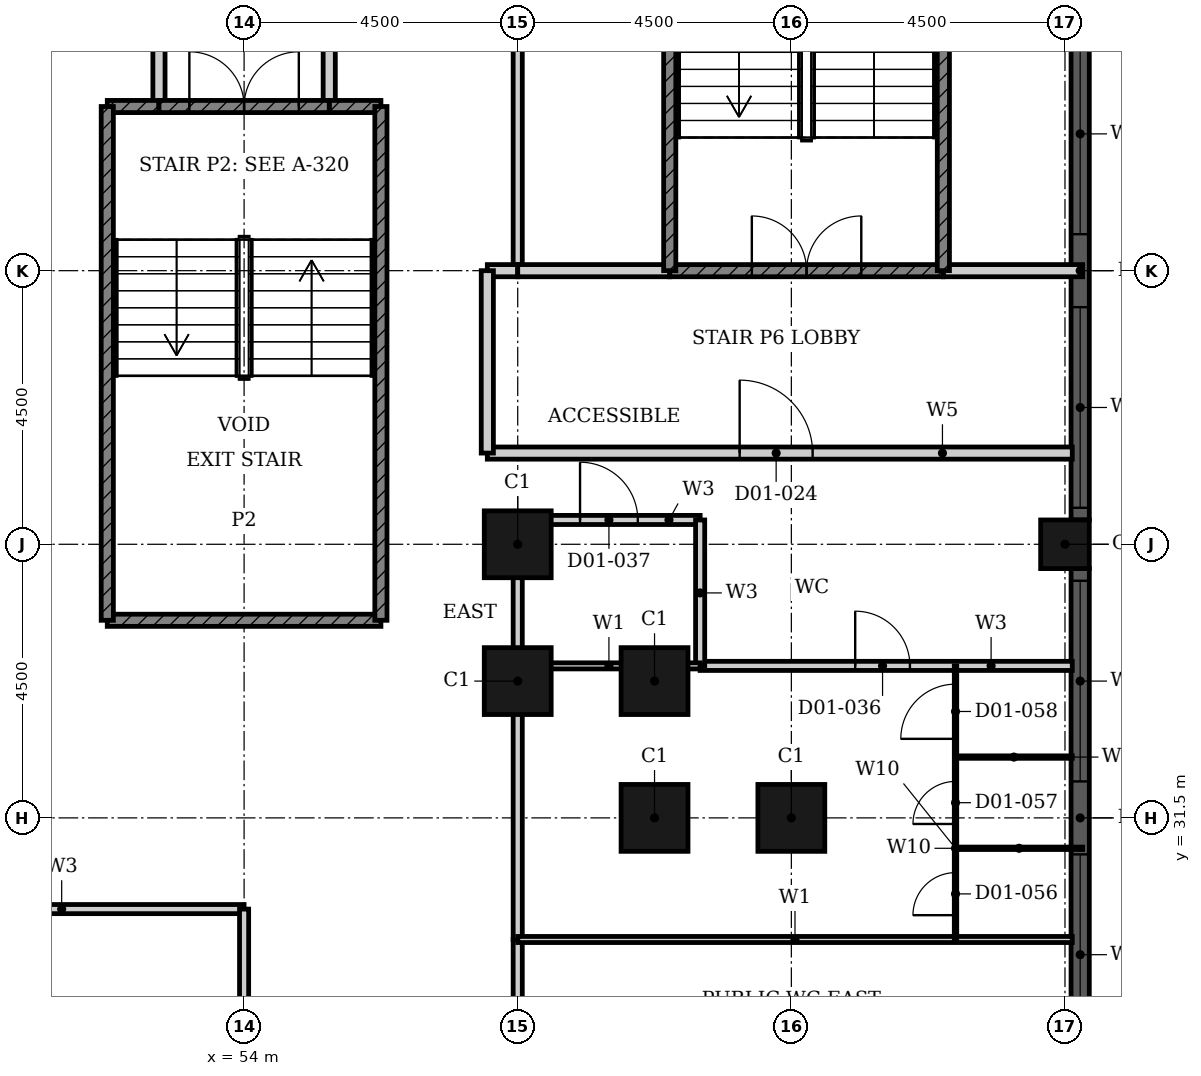
"""IFC4 building model, lengths in metres.
Left out: names, types, materials, properties, quantities, classifications, styles, units other than length and angle.
Written with IfcOpenShell. Run it as: python <this file> out.ifc"""

import sys

from ifc_helpers import new_model, si_unit, direction, frame, frame_2d, origin, origin_2d, place, context, subcontext, project, spatial, rectangle, hollow_rectangle, extrude, element, fill, save


model = new_model("IFC4")
c1 = context("Model", 3, precision=1e-05, world=origin(), true_north=direction((0.0, 1.0)))
c2 = subcontext(c1, "Body", "Model", "MODEL_VIEW")
j1 = project(units=[si_unit("LENGTHUNIT", "METRE"), si_unit("PLANEANGLEUNIT", "RADIAN")], contexts=[c1])
p1 = place(None, origin())
s1 = spatial("IfcSite", under=j1, at=p1, CompositionType="ELEMENT")
p2 = place(p1, origin())
s2 = spatial("IfcBuilding", under=s1, at=p2, CompositionType="ELEMENT")
p3 = place(p2, frame((0.0, 0.0, 6.6)))
s3 = spatial("IfcBuildingStorey", under=s2, at=p3, CompositionType="ELEMENT", Elevation=6.6)
for number, where, z_axis, x_axis in (
    (1, (63.0, 31.5, 0.0), (0.0, 0.0, 1.0), (1.0, 0.0, 0.0)),
    (2, (60.75, 31.5, 0.0), (0.0, 0.0, 1.0), (1.0, 0.0, 0.0)),
    (3, (60.75, 33.75, 0.0), (0.0, 0.0, 1.0), (1.0, 0.0, 0.0)),
    (4, (58.5, 33.75, 0.0), (0.0, 0.0, 1.0), (1.0, 0.0, 0.0)),
    (5, (58.5, 36.0, 0.0), (0.0, 0.0, 1.0), (1.0, 0.0, 0.0)),
):
    element("IfcColumn", number, at=place(p3, frame(where, z_axis=z_axis, x_axis=x_axis)), inside=s3, PredefinedType="COLUMN", context=c2, shape_type="SweptSolid", body=[
        extrude(hollow_rectangle(XDim=1.1, YDim=1.1, WallThickness=0.036, at=origin_2d()), origin(), (0.0, 0.0, 1.0), 5.4),
    ])
p4 = place(p3, frame((67.5, 36.0, 0.0), z_axis=(0.0, 0.0, 1.0), x_axis=(1.0, 0.0, 0.0)))
e6 = element("IfcColumn", 6, at=p4, inside=s3, PredefinedType="COLUMN", context=c2, shape_type="SweptSolid", body=[
    extrude(hollow_rectangle(XDim=0.8, YDim=0.8, WallThickness=0.025, at=origin_2d()), origin(), (0.0, 0.0, 1.0), 5.4),
])
p5 = place(p3, frame((67.75, 27.4, 0.0), z_axis=(0.0, 0.0, 1.0), x_axis=(0.0, 1.0, 0.0)))
e7 = element("IfcWall", 7, at=p5, inside=s3, PredefinedType="SOLIDWALL", context=c2, shape_type="SweptSolid", body=[
    extrude(rectangle(XDim=8.2, YDim=0.3, at=frame_2d((4.1, 0.0))), origin(), (0.0, 0.0, 1.0), 5.4),
])
p6 = place(p5, frame((0.2, 0.0, 0.9)))
e8 = element("IfcOpeningElement", 8, at=p6, cuts=e7, PredefinedType="OPENING", context=c2, shape_type="SweptSolid", body=[
    extrude(rectangle(XDim=3.3, YDim=3.5, at=frame_2d((1.65, 1.75))), frame((0.0, 0.16, 0.0), z_axis=(0.0, -1.0, 0.0), x_axis=(1.0, 0.0, 0.0)), (0.0, 0.0, 1.0), 0.32),
])
p7 = place(p5, frame((4.7, 0.0, 0.9)))
e9 = element("IfcOpeningElement", 9, at=p7, cuts=e7, PredefinedType="OPENING", context=c2, shape_type="SweptSolid", body=[
    extrude(rectangle(XDim=3.3, YDim=3.5, at=frame_2d((1.65, 1.75))), frame((0.0, 0.16, 0.0), z_axis=(0.0, -1.0, 0.0), x_axis=(1.0, 0.0, 0.0)), (0.0, 0.0, 1.0), 0.32),
])
p8 = place(p3, frame((67.75, 36.4, 0.0), z_axis=(0.0, 0.0, 1.0), x_axis=(0.0, 1.0, 0.0)))
e10 = element("IfcWall", 10, at=p8, inside=s3, PredefinedType="SOLIDWALL", context=c2, shape_type="SweptSolid", body=[
    extrude(rectangle(XDim=8.2, YDim=0.3, at=frame_2d((4.1, 0.0))), origin(), (0.0, 0.0, 1.0), 5.4),
])
p9 = place(p8, frame((0.2, 0.0, 0.9)))
e11 = element("IfcOpeningElement", 11, at=p9, cuts=e10, PredefinedType="OPENING", context=c2, shape_type="SweptSolid", body=[
    extrude(rectangle(XDim=3.3, YDim=3.5, at=frame_2d((1.65, 1.75))), frame((0.0, 0.16, 0.0), z_axis=(0.0, -1.0, 0.0), x_axis=(1.0, 0.0, 0.0)), (0.0, 0.0, 1.0), 0.32),
])
p10 = place(p8, frame((4.7, 0.0, 0.9)))
e12 = element("IfcOpeningElement", 12, at=p10, cuts=e10, PredefinedType="OPENING", context=c2, shape_type="SweptSolid", body=[
    extrude(rectangle(XDim=3.3, YDim=3.5, at=frame_2d((1.65, 1.75))), frame((0.0, 0.16, 0.0), z_axis=(0.0, -1.0, 0.0), x_axis=(1.0, 0.0, 0.0)), (0.0, 0.0, 1.0), 0.32),
])
p11 = place(p3, frame((48.0, 30.0, 0.0), z_axis=(0.0, 0.0, 1.0), x_axis=(1.0, 0.0, 0.0)))
e13 = element("IfcWall", 13, at=p11, inside=s3, PredefinedType="PARTITIONING", context=c2, shape_type="SweptSolid", body=[
    extrude(rectangle(XDim=6.0, YDim=0.15, at=frame_2d((3.0, 0.0))), origin(), (0.0, 0.0, 1.0), 5.05),
])
p12 = place(p3, frame((61.5, 34.0, 0.0), z_axis=(0.0, 0.0, 1.0), x_axis=(1.0, 0.0, 0.0)))
e14 = element("IfcWall", 14, at=p12, inside=s3, PredefinedType="PARTITIONING", context=c2, shape_type="SweptSolid", body=[
    extrude(rectangle(XDim=6.12, YDim=0.15, at=frame_2d((3.06, 0.0))), origin(), (0.0, 0.0, 1.0), 5.05),
])
p13 = place(p12, frame((2.55, 0.0, 0.0)))
e15 = element("IfcOpeningElement", 15, at=p13, cuts=e14, PredefinedType="OPENING", context=c2, shape_type="SweptSolid", body=[
    extrude(rectangle(XDim=0.9, YDim=2.1, at=frame_2d((0.45, 1.05))), frame((0.0, 0.085, 0.0), z_axis=(0.0, -1.0, 0.0), x_axis=(1.0, 0.0, 0.0)), (0.0, 0.0, 1.0), 0.17),
])
p14 = place(p3, frame((58.5, 36.4, 0.0), z_axis=(0.0, 0.0, 1.0), x_axis=(1.0, 0.0, 0.0)))
e16 = element("IfcWall", 16, at=p14, inside=s3, PredefinedType="PARTITIONING", context=c2, shape_type="SweptSolid", body=[
    extrude(rectangle(XDim=3.0, YDim=0.15, at=frame_2d((1.5, 0.0))), origin(), (0.0, 0.0, 1.0), 5.05),
])
p15 = place(p14, frame((1.025, 0.0, 0.0)))
e17 = element("IfcOpeningElement", 17, at=p15, cuts=e16, PredefinedType="OPENING", context=c2, shape_type="SweptSolid", body=[
    extrude(rectangle(XDim=0.95, YDim=2.1, at=frame_2d((0.475, 1.05))), frame((0.0, 0.085, 0.0), z_axis=(0.0, -1.0, 0.0), x_axis=(1.0, 0.0, 0.0)), (0.0, 0.0, 1.0), 0.17),
])
p16 = place(p3, frame((54.0, 24.0, 0.0), z_axis=(0.0, 0.0, 1.0), x_axis=(0.0, 1.0, 0.0)))
e18 = element("IfcWall", 18, at=p16, inside=s3, PredefinedType="PARTITIONING", context=c2, shape_type="SweptSolid", body=[
    extrude(rectangle(XDim=6.0, YDim=0.15, at=frame_2d((3.0, 0.0))), origin(), (0.0, 0.0, 1.0), 5.05),
])
p17 = place(p3, frame((58.5, 23.0, 0.0), z_axis=(0.0, 0.0, 1.0), x_axis=(0.0, 1.0, 0.0)))
e19 = element("IfcWall", 19, at=p17, inside=s3, PredefinedType="PARTITIONING", context=c2, shape_type="SweptSolid", body=[
    extrude(rectangle(XDim=6.5, YDim=0.15, at=frame_2d((3.25, 0.0))), origin(), (0.0, 0.0, 1.0), 5.05),
])
p18 = place(p17, frame((1.6, 0.0, 0.0)))
e20 = element("IfcOpeningElement", 20, at=p18, cuts=e19, PredefinedType="OPENING", context=c2, shape_type="SweptSolid", body=[
    extrude(rectangle(XDim=1.5, YDim=2.4, at=frame_2d((0.75, 1.2))), frame((0.0, 0.085, 0.0), z_axis=(0.0, -1.0, 0.0), x_axis=(1.0, 0.0, 0.0)), (0.0, 0.0, 1.0), 0.17),
])
p19 = place(p3, frame((58.5, 29.5, 0.0), z_axis=(0.0, 0.0, 1.0), x_axis=(0.0, 1.0, 0.0)))
e21 = element("IfcWall", 21, at=p19, inside=s3, PredefinedType="PARTITIONING", context=c2, shape_type="SweptSolid", body=[
    extrude(rectangle(XDim=4.5, YDim=0.15, at=frame_2d((2.25, 0.0))), origin(), (0.0, 0.0, 1.0), 5.05),
])
p20 = place(p3, frame((58.5, 34.0, 0.0), z_axis=(0.0, 0.0, 1.0), x_axis=(0.0, 1.0, 0.0)))
e22 = element("IfcWall", 22, at=p20, inside=s3, PredefinedType="PARTITIONING", context=c2, shape_type="SweptSolid", body=[
    extrude(rectangle(XDim=2.4, YDim=0.15, at=frame_2d((1.2, 0.0))), origin(), (0.0, 0.0, 1.0), 5.05),
])
p21 = place(p3, frame((58.5, 40.5, 0.0), z_axis=(0.0, 0.0, 1.0), x_axis=(0.0, 1.0, 0.0)))
e23 = element("IfcWall", 23, at=p21, inside=s3, PredefinedType="PARTITIONING", context=c2, shape_type="SweptSolid", body=[
    extrude(rectangle(XDim=13.69, YDim=0.15, at=frame_2d((6.845, 0.0))), origin(), (0.0, 0.0, 1.0), 5.05),
])
p22 = place(p21, frame((6.0, 0.0, 0.0)))
e24 = element("IfcOpeningElement", 24, at=p22, cuts=e23, PredefinedType="OPENING", context=c2, shape_type="SweptSolid", body=[
    extrude(rectangle(XDim=1.5, YDim=2.4, at=frame_2d((0.75, 1.2))), frame((0.0, 0.085, 0.0), z_axis=(0.0, -1.0, 0.0), x_axis=(1.0, 0.0, 0.0)), (0.0, 0.0, 1.0), 0.17),
])
p23 = place(p3, frame((61.5, 34.0, 0.0), z_axis=(0.0, 0.0, 1.0), x_axis=(0.0, 1.0, 0.0)))
e25 = element("IfcWall", 25, at=p23, inside=s3, PredefinedType="PARTITIONING", context=c2, shape_type="SweptSolid", body=[
    extrude(rectangle(XDim=2.4, YDim=0.15, at=frame_2d((1.2, 0.0))), origin(), (0.0, 0.0, 1.0), 5.05),
])
p24 = place(p3, frame((58.5, 29.5, 0.0), z_axis=(0.0, 0.0, 1.0), x_axis=(1.0, 0.0, 0.0)))
e26 = element("IfcWall", 26, at=p24, inside=s3, PredefinedType="PARTITIONING", context=c2, shape_type="SweptSolid", body=[
    extrude(rectangle(XDim=9.12, YDim=0.1, at=frame_2d((4.56, 0.0))), origin(), (0.0, 0.0, 1.0), 5.05),
])
p25 = place(p3, frame((58.5, 34.0, 0.0), z_axis=(0.0, 0.0, 1.0), x_axis=(1.0, 0.0, 0.0)))
e27 = element("IfcWall", 27, at=p25, inside=s3, PredefinedType="PARTITIONING", context=c2, shape_type="SweptSolid", body=[
    extrude(rectangle(XDim=3.0, YDim=0.1, at=frame_2d((1.5, 0.0))), origin(), (0.0, 0.0, 1.0), 5.05),
])
p26 = place(p3, frame((58.0, 37.5, 0.0), z_axis=(0.0, 0.0, 1.0), x_axis=(1.0, 0.0, 0.0)))
e28 = element("IfcWall", 28, at=p26, inside=s3, PredefinedType="PARTITIONING", context=c2, shape_type="SweptSolid", body=[
    extrude(rectangle(XDim=9.62, YDim=0.2, at=frame_2d((4.81, 0.0))), origin(), (0.0, 0.0, 1.0), 5.05),
])
p27 = place(p26, frame((4.15, 0.0, 0.0)))
e29 = element("IfcOpeningElement", 29, at=p27, cuts=e28, PredefinedType="OPENING", context=c2, shape_type="SweptSolid", body=[
    extrude(rectangle(XDim=1.2, YDim=2.1, at=frame_2d((0.6, 1.05))), frame((0.0, 0.11, 0.0), z_axis=(0.0, -1.0, 0.0), x_axis=(1.0, 0.0, 0.0)), (0.0, 0.0, 1.0), 0.22),
])
p28 = place(p3, frame((58.0, 40.5, 0.0), z_axis=(0.0, 0.0, 1.0), x_axis=(1.0, 0.0, 0.0)))
e30 = element("IfcWall", 30, at=p28, inside=s3, PredefinedType="PARTITIONING", context=c2, shape_type="SweptSolid", body=[
    extrude(rectangle(XDim=0.5, YDim=0.2, at=frame_2d((0.25, 0.0))), origin(), (0.0, 0.0, 1.0), 5.05),
])
p29 = place(p3, frame((58.5, 40.5, 0.0), z_axis=(0.0, 0.0, 1.0), x_axis=(1.0, 0.0, 0.0)))
e31 = element("IfcWall", 31, at=p29, inside=s3, PredefinedType="PARTITIONING", context=c2, shape_type="SweptSolid", body=[
    extrude(rectangle(XDim=2.5, YDim=0.2, at=frame_2d((1.25, 0.0))), origin(), (0.0, 0.0, 1.0), 5.05),
])
p30 = place(p3, frame((65.5, 40.5, 0.0), z_axis=(0.0, 0.0, 1.0), x_axis=(1.0, 0.0, 0.0)))
e32 = element("IfcWall", 32, at=p30, inside=s3, PredefinedType="PARTITIONING", context=c2, shape_type="SweptSolid", body=[
    extrude(rectangle(XDim=2.29, YDim=0.2, at=frame_2d((1.145, 0.0))), origin(), (0.0, 0.0, 1.0), 5.05),
])
p31 = place(p3, frame((52.6, 43.2, 0.0), z_axis=(0.0, 0.0, 1.0), x_axis=(0.0, 1.0, 0.0)))
e33 = element("IfcWall", 33, at=p31, inside=s3, PredefinedType="PARTITIONING", context=c2, shape_type="SweptSolid", body=[
    extrude(rectangle(XDim=1.8, YDim=0.2, at=frame_2d((0.9, 0.0))), origin(), (0.0, 0.0, 1.0), 5.05),
])
p32 = place(p3, frame((55.4, 43.2, 0.0), z_axis=(0.0, 0.0, 1.0), x_axis=(0.0, 1.0, 0.0)))
e34 = element("IfcWall", 34, at=p32, inside=s3, PredefinedType="PARTITIONING", context=c2, shape_type="SweptSolid", body=[
    extrude(rectangle(XDim=10.92, YDim=0.2, at=frame_2d((5.46, 0.0))), origin(), (0.0, 0.0, 1.0), 5.05),
])
p33 = place(p32, frame((4.8, 0.0, 0.0)))
e35 = element("IfcOpeningElement", 35, at=p33, cuts=e34, PredefinedType="OPENING", context=c2, shape_type="SweptSolid", body=[
    extrude(rectangle(XDim=1.2, YDim=2.1, at=frame_2d((0.6, 1.05))), frame((0.0, 0.11, 0.0), z_axis=(0.0, -1.0, 0.0), x_axis=(1.0, 0.0, 0.0)), (0.0, 0.0, 1.0), 0.22),
])
p34 = place(p3, frame((58.0, 37.5, 0.0), z_axis=(0.0, 0.0, 1.0), x_axis=(0.0, 1.0, 0.0)))
e36 = element("IfcWall", 36, at=p34, inside=s3, PredefinedType="PARTITIONING", context=c2, shape_type="SweptSolid", body=[
    extrude(rectangle(XDim=3.0, YDim=0.2, at=frame_2d((1.5, 0.0))), origin(), (0.0, 0.0, 1.0), 5.05),
])
p35 = place(p3, frame((51.75, 34.75, 0.0), z_axis=(0.0, 0.0, 1.0), x_axis=(1.0, 0.0, 0.0)))
e37 = element("IfcWall", 37, at=p35, inside=s3, PredefinedType="SHEAR", context=c2, shape_type="SweptSolid", body=[
    extrude(rectangle(XDim=4.5, YDim=0.2, at=frame_2d((2.25, 0.0))), origin(), (0.0, 0.0, 1.0), 5.05),
])
p36 = place(p3, frame((61.0, 40.5, 0.0), z_axis=(0.0, 0.0, 1.0), x_axis=(1.0, 0.0, 0.0)))
e38 = element("IfcWall", 38, at=p36, inside=s3, PredefinedType="SHEAR", context=c2, shape_type="SweptSolid", body=[
    extrude(rectangle(XDim=4.5, YDim=0.2, at=frame_2d((2.25, 0.0))), origin(), (0.0, 0.0, 1.0), 5.05),
])
p37 = place(p36, frame((1.35, 0.0, 0.0)))
e39 = element("IfcOpeningElement", 39, at=p37, cuts=e38, PredefinedType="OPENING", context=c2, shape_type="SweptSolid", body=[
    extrude(rectangle(XDim=1.8, YDim=2.1, at=frame_2d((0.9, 1.05))), frame((0.0, 0.11, 0.0), z_axis=(0.0, -1.0, 0.0), x_axis=(1.0, 0.0, 0.0)), (0.0, 0.0, 1.0), 0.22),
])
for number, where, z_axis, x_axis in (
    (40, (51.75, 43.2, 0.0), (0.0, 0.0, 1.0), (1.0, 0.0, 0.0)),
    (41, (55.4, 43.2, 0.0), (0.0, 0.0, 1.0), (1.0, 0.0, 0.0)),
):
    element("IfcWall", number, at=place(p3, frame(where, z_axis=z_axis, x_axis=x_axis)), inside=s3, PredefinedType="SHEAR", context=c2, shape_type="SweptSolid", body=[
        extrude(rectangle(XDim=0.85, YDim=0.2, at=frame_2d((0.425, 0.0))), origin(), (0.0, 0.0, 1.0), 5.05),
    ])
p38 = place(p3, frame((52.6, 43.2, 0.0), z_axis=(0.0, 0.0, 1.0), x_axis=(1.0, 0.0, 0.0)))
e42 = element("IfcWall", 42, at=p38, inside=s3, PredefinedType="SHEAR", context=c2, shape_type="SweptSolid", body=[
    extrude(rectangle(XDim=2.8, YDim=0.2, at=frame_2d((1.4, 0.0))), origin(), (0.0, 0.0, 1.0), 5.05),
])
p39 = place(p38, frame((0.5, 0.0, 0.0)))
e43 = element("IfcOpeningElement", 43, at=p39, cuts=e42, PredefinedType="OPENING", context=c2, shape_type="SweptSolid", body=[
    extrude(rectangle(XDim=1.8, YDim=2.1, at=frame_2d((0.9, 1.05))), frame((0.0, 0.11, 0.0), z_axis=(0.0, -1.0, 0.0), x_axis=(1.0, 0.0, 0.0)), (0.0, 0.0, 1.0), 0.22),
])
for number, where, z_axis, x_axis in (
    (44, (51.75, 34.75, 0.0), (0.0, 0.0, 1.0), (0.0, 1.0, 0.0)),
    (45, (56.25, 34.75, 0.0), (0.0, 0.0, 1.0), (0.0, 1.0, 0.0)),
    (46, (61.0, 40.5, 0.0), (0.0, 0.0, 1.0), (0.0, 1.0, 0.0)),
    (47, (65.5, 40.5, 0.0), (0.0, 0.0, 1.0), (0.0, 1.0, 0.0)),
):
    element("IfcWall", number, at=place(p3, frame(where, z_axis=z_axis, x_axis=x_axis)), inside=s3, PredefinedType="SHEAR", context=c2, shape_type="SweptSolid", body=[
        extrude(rectangle(XDim=8.45, YDim=0.2, at=frame_2d((4.225, 0.0))), origin(), (0.0, 0.0, 1.0), 5.05),
    ])
p40 = place(p3, frame((67.79, 31.0, 0.0), z_axis=(0.0, 0.0, 1.0), x_axis=(-1.0, 0.0, 0.0)))
e48 = element("IfcWall", 48, at=p40, inside=s3, PredefinedType="PARTITIONING", context=c2, shape_type="SweptSolid", body=[
    extrude(rectangle(XDim=2.09, YDim=0.04, at=frame_2d((1.045, 0.0))), origin(), (0.0, 0.0, 1.0), 5.05),
])
p41 = place(p3, frame((67.62, 32.5, 0.0), z_axis=(0.0, 0.0, 1.0), x_axis=(-1.0, 0.0, 0.0)))
e49 = element("IfcWall", 49, at=p41, inside=s3, PredefinedType="PARTITIONING", context=c2, shape_type="SweptSolid", body=[
    extrude(rectangle(XDim=1.92, YDim=0.04, at=frame_2d((0.96, 0.0))), origin(), (0.0, 0.0, 1.0), 5.05),
])
p42 = place(p3, frame((65.7, 29.5, 0.0), z_axis=(0.0, 0.0, 1.0), x_axis=(0.0, 1.0, 0.0)))
e50 = element("IfcWall", 50, at=p42, inside=s3, PredefinedType="PARTITIONING", context=c2, shape_type="SweptSolid", body=[
    extrude(rectangle(XDim=4.5, YDim=0.04, at=frame_2d((2.25, 0.0))), origin(), (0.0, 0.0, 1.0), 5.05),
])
p43 = place(p42, frame((0.4, 0.0, 0.0)))
e51 = element("IfcOpeningElement", 51, at=p43, cuts=e50, PredefinedType="OPENING", context=c2, shape_type="SweptSolid", body=[
    extrude(rectangle(XDim=0.7, YDim=2.0, at=frame_2d((0.35, 1.0))), frame((0.0, 0.03, 0.0), z_axis=(0.0, -1.0, 0.0), x_axis=(1.0, 0.0, 0.0)), (0.0, 0.0, 1.0), 0.06),
])
p44 = place(p42, frame((1.9, 0.0, 0.0)))
e52 = element("IfcOpeningElement", 52, at=p44, cuts=e50, PredefinedType="OPENING", context=c2, shape_type="SweptSolid", body=[
    extrude(rectangle(XDim=0.7, YDim=2.0, at=frame_2d((0.35, 1.0))), frame((0.0, 0.03, 0.0), z_axis=(0.0, -1.0, 0.0), x_axis=(1.0, 0.0, 0.0)), (0.0, 0.0, 1.0), 0.06),
])
p45 = place(p42, frame((3.3, 0.0, 0.0)))
e53 = element("IfcOpeningElement", 53, at=p45, cuts=e50, PredefinedType="OPENING", context=c2, shape_type="SweptSolid", body=[
    extrude(rectangle(XDim=0.9, YDim=2.0, at=frame_2d((0.45, 1.0))), frame((0.0, 0.03, 0.0), z_axis=(0.0, -1.0, 0.0), x_axis=(1.0, 0.0, 0.0)), (0.0, 0.0, 1.0), 0.06),
])
p46 = place(p6, origin())
e54 = element("IfcWindow", 54, at=p46, inside=s3, PartitioningType="SINGLE_PANEL", PredefinedType="WINDOW", context=c2, shape_type="SweptSolid", body=[
    extrude(rectangle(XDim=3.3, YDim=3.5, at=frame_2d((1.65, 1.75))), frame((0.0, 0.03, 0.0), z_axis=(0.0, -1.0, 0.0), x_axis=(1.0, 0.0, 0.0)), (0.0, 0.0, 1.0), 0.06),
])
fill(e8, e54)
p47 = place(p7, origin())
e55 = element("IfcWindow", 55, at=p47, inside=s3, PartitioningType="SINGLE_PANEL", PredefinedType="WINDOW", context=c2, shape_type="SweptSolid", body=[
    extrude(rectangle(XDim=3.3, YDim=3.5, at=frame_2d((1.65, 1.75))), frame((0.0, 0.03, 0.0), z_axis=(0.0, -1.0, 0.0), x_axis=(1.0, 0.0, 0.0)), (0.0, 0.0, 1.0), 0.06),
])
fill(e9, e55)
p48 = place(p9, origin())
e56 = element("IfcWindow", 56, at=p48, inside=s3, PartitioningType="SINGLE_PANEL", PredefinedType="WINDOW", context=c2, shape_type="SweptSolid", body=[
    extrude(rectangle(XDim=3.3, YDim=3.5, at=frame_2d((1.65, 1.75))), frame((0.0, 0.03, 0.0), z_axis=(0.0, -1.0, 0.0), x_axis=(1.0, 0.0, 0.0)), (0.0, 0.0, 1.0), 0.06),
])
fill(e11, e56)
p49 = place(p10, origin())
e57 = element("IfcWindow", 57, at=p49, inside=s3, PartitioningType="SINGLE_PANEL", PredefinedType="WINDOW", context=c2, shape_type="SweptSolid", body=[
    extrude(rectangle(XDim=3.3, YDim=3.5, at=frame_2d((1.65, 1.75))), frame((0.0, 0.03, 0.0), z_axis=(0.0, -1.0, 0.0), x_axis=(1.0, 0.0, 0.0)), (0.0, 0.0, 1.0), 0.06),
])
fill(e12, e57)
p50 = place(p39, origin())
e58 = element("IfcDoor", 58, at=p50, inside=s3, OperationType="DOUBLE_DOOR_SINGLE_SWING", PredefinedType="DOOR", context=c2, shape_type="SweptSolid", body=[
    extrude(rectangle(XDim=1.8, YDim=2.1, at=frame_2d((0.9, 1.05))), frame((0.0, 0.025, 0.0), z_axis=(0.0, -1.0, 0.0), x_axis=(1.0, 0.0, 0.0)), (0.0, 0.0, 1.0), 0.05),
])
fill(e43, e58)
p51 = place(p27, origin())
e59 = element("IfcDoor", 59, at=p51, inside=s3, OperationType="SINGLE_SWING_RIGHT", PredefinedType="DOOR", context=c2, shape_type="SweptSolid", body=[
    extrude(rectangle(XDim=1.2, YDim=2.1, at=frame_2d((0.6, 1.05))), frame((0.0, 0.025, 0.0), z_axis=(0.0, -1.0, 0.0), x_axis=(1.0, 0.0, 0.0)), (0.0, 0.0, 1.0), 0.05),
])
fill(e29, e59)
p52 = place(p37, origin())
e60 = element("IfcDoor", 60, at=p52, inside=s3, OperationType="DOUBLE_DOOR_SINGLE_SWING", PredefinedType="DOOR", context=c2, shape_type="SweptSolid", body=[
    extrude(rectangle(XDim=1.8, YDim=2.1, at=frame_2d((0.9, 1.05))), frame((0.0, 0.025, 0.0), z_axis=(0.0, -1.0, 0.0), x_axis=(1.0, 0.0, 0.0)), (0.0, 0.0, 1.0), 0.05),
])
fill(e39, e60)
p53 = place(p13, origin())
e61 = element("IfcDoor", 61, at=p53, inside=s3, OperationType="SINGLE_SWING_RIGHT", PredefinedType="DOOR", context=c2, shape_type="SweptSolid", body=[
    extrude(rectangle(XDim=0.9, YDim=2.1, at=frame_2d((0.45, 1.05))), frame((0.0, 0.025, 0.0), z_axis=(0.0, -1.0, 0.0), x_axis=(1.0, 0.0, 0.0)), (0.0, 0.0, 1.0), 0.05),
])
fill(e15, e61)
p54 = place(p15, origin())
e62 = element("IfcDoor", 62, at=p54, inside=s3, OperationType="SINGLE_SWING_RIGHT", PredefinedType="DOOR", context=c2, shape_type="SweptSolid", body=[
    extrude(rectangle(XDim=0.95, YDim=2.1, at=frame_2d((0.475, 1.05))), frame((0.0, 0.025, 0.0), z_axis=(0.0, -1.0, 0.0), x_axis=(1.0, 0.0, 0.0)), (0.0, 0.0, 1.0), 0.05),
])
fill(e17, e62)
p55 = place(p43, origin())
e63 = element("IfcDoor", 63, at=p55, inside=s3, OperationType="SINGLE_SWING_LEFT", PredefinedType="DOOR", context=c2, shape_type="SweptSolid", body=[
    extrude(rectangle(XDim=0.7, YDim=2.0, at=frame_2d((0.35, 1.0))), frame((0.0, 0.02, 0.0), z_axis=(0.0, -1.0, 0.0), x_axis=(1.0, 0.0, 0.0)), (0.0, 0.0, 1.0), 0.04),
])
fill(e51, e63)
p56 = place(p44, origin())
e64 = element("IfcDoor", 64, at=p56, inside=s3, OperationType="SINGLE_SWING_RIGHT", PredefinedType="DOOR", context=c2, shape_type="SweptSolid", body=[
    extrude(rectangle(XDim=0.7, YDim=2.0, at=frame_2d((0.35, 1.0))), frame((0.0, 0.02, 0.0), z_axis=(0.0, -1.0, 0.0), x_axis=(1.0, 0.0, 0.0)), (0.0, 0.0, 1.0), 0.04),
])
fill(e52, e64)
p57 = place(p45, origin())
e65 = element("IfcDoor", 65, at=p57, inside=s3, OperationType="SINGLE_SWING_RIGHT", PredefinedType="DOOR", context=c2, shape_type="SweptSolid", body=[
    extrude(rectangle(XDim=0.9, YDim=2.0, at=frame_2d((0.45, 1.0))), frame((0.0, 0.02, 0.0), z_axis=(0.0, -1.0, 0.0), x_axis=(1.0, 0.0, 0.0)), (0.0, 0.0, 1.0), 0.04),
])
fill(e53, e65)
save(model, sys.argv[1])
